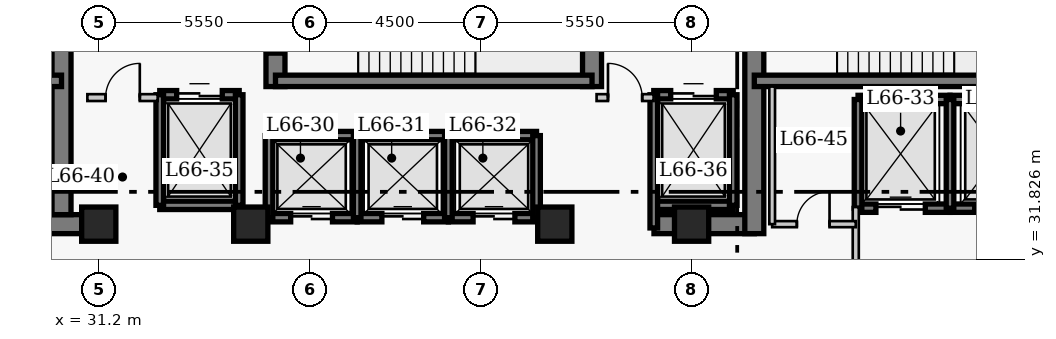
"""IFC4 building model, lengths in metres.
Left out: names, types, materials, properties, quantities, classifications, styles, units other than length and angle.
Written with IfcOpenShell. Run it as: python <this file> out.ifc"""

import sys

from ifc_helpers import new_model, si_unit, direction, frame, frame_2d, origin, origin_2d, place, context, subcontext, project, spatial, rectangle, extrude, element, fill, save


model = new_model("IFC4")
c1 = context("Model", 3, precision=1e-05, world=origin(), true_north=direction((0.0, 1.0)))
c2 = subcontext(c1, "Body", "Model", "MODEL_VIEW")
j1 = project(units=[si_unit("LENGTHUNIT", "METRE"), si_unit("PLANEANGLEUNIT", "RADIAN")], contexts=[c1])
p1 = place(None, origin())
s1 = spatial("IfcSite", under=j1, at=p1, CompositionType="ELEMENT")
p2 = place(p1, origin())
s2 = spatial("IfcBuilding", under=s1, at=p2, CompositionType="ELEMENT")
p3 = place(p2, frame((0.0, 0.0, 265.4)))
s3 = spatial("IfcBuildingStorey", under=s2, at=p3, CompositionType="ELEMENT", Elevation=265.4)
p4 = place(p3, frame((28.45, 32.75, 0.0), z_axis=(0.0, 0.0, 1.0), x_axis=(1.0, 0.0, 0.0)))
e1 = element("IfcWall", 1, at=p4, inside=s3, PredefinedType="SHEAR", context=c2, shape_type="SweptSolid", body=[
    extrude(rectangle(XDim=2.4, YDim=0.5, at=frame_2d((1.2, 0.0))), origin(), (0.0, 0.0, 1.0), 4.0),
])
p5 = place(p3, frame((45.81, 32.75, 0.0), z_axis=(0.0, 0.0, 1.0), x_axis=(1.0, 0.0, 0.0)))
e2 = element("IfcWall", 2, at=p5, inside=s3, PredefinedType="SHEAR", context=c2, shape_type="SweptSolid", body=[
    extrude(rectangle(XDim=2.64, YDim=0.5, at=frame_2d((1.32, 0.0))), origin(), (0.0, 0.0, 1.0), 4.0),
])
p6 = place(p3, frame((30.22, 33.0, 0.0), z_axis=(0.0, 0.0, 1.0), x_axis=(0.0, 1.0, 0.0)))
e3 = element("IfcWall", 3, at=p6, inside=s3, PredefinedType="SHEAR", context=c2, shape_type="SweptSolid", body=[
    extrude(rectangle(XDim=7.32, YDim=0.5, at=frame_2d((3.66, 0.0))), origin(), (0.0, 0.0, 1.0), 4.0),
])
p7 = place(p3, frame((35.85, 36.37, 0.0), z_axis=(0.0, 0.0, 1.0), x_axis=(0.0, 1.0, 0.0)))
e4 = element("IfcWall", 4, at=p7, inside=s3, PredefinedType="SHEAR", context=c2, shape_type="SweptSolid", body=[
    extrude(rectangle(XDim=3.95, YDim=0.5, at=frame_2d((1.975, 0.0))), origin(), (0.0, 0.0, 1.0), 4.0),
])
p8 = place(p7, frame((0.88, 0.0, 0.0)))
e5 = element("IfcOpeningElement", 5, at=p8, cuts=e4, PredefinedType="OPENING", context=c2, shape_type="SweptSolid", body=[
    extrude(rectangle(XDim=1.1, YDim=2.15, at=frame_2d((0.55, 1.075))), frame((0.0, 0.26, 0.0), z_axis=(0.0, -1.0, 0.0), x_axis=(1.0, 0.0, 0.0)), (0.0, 0.0, 1.0), 0.52),
])
p9 = place(p3, frame((44.18, 36.37, 0.0), z_axis=(0.0, 0.0, 1.0), x_axis=(0.0, 1.0, 0.0)))
e6 = element("IfcWall", 6, at=p9, inside=s3, PredefinedType="SHEAR", context=c2, shape_type="SweptSolid", body=[
    extrude(rectangle(XDim=3.95, YDim=0.5, at=frame_2d((1.975, 0.0))), origin(), (0.0, 0.0, 1.0), 4.0),
])
p10 = place(p3, frame((48.45, 32.5, 0.0), z_axis=(0.0, 0.0, 1.0), x_axis=(0.0, 1.0, 0.0)))
e7 = element("IfcWall", 7, at=p10, inside=s3, PredefinedType="SHEAR", context=c2, shape_type="SweptSolid", body=[
    extrude(rectangle(XDim=7.82, YDim=0.5, at=frame_2d((3.91, 0.0))), origin(), (0.0, 0.0, 1.0), 4.0),
])
p11 = place(p10, frame((5.7, 0.0, 0.0)))
e8 = element("IfcOpeningElement", 8, at=p11, cuts=e7, PredefinedType="OPENING", context=c2, shape_type="SweptSolid", body=[
    extrude(rectangle(XDim=1.1, YDim=2.15, at=frame_2d((0.55, 1.075))), frame((0.0, 0.26, 0.0), z_axis=(0.0, -1.0, 0.0), x_axis=(1.0, 0.0, 0.0)), (0.0, 0.0, 1.0), 0.52),
])
p12 = place(p3, frame((21.9, 36.52, 0.0), z_axis=(0.0, 0.0, 1.0), x_axis=(1.0, 0.0, 0.0)))
e9 = element("IfcWall", 9, at=p12, inside=s3, PredefinedType="SHEAR", context=c2, shape_type="SweptSolid", body=[
    extrude(rectangle(XDim=8.32, YDim=0.3, at=frame_2d((4.16, 0.0))), origin(), (0.0, 0.0, 1.0), 4.0),
])
p13 = place(p12, frame((0.9, 0.0, 0.0)))
e10 = element("IfcOpeningElement", 10, at=p13, cuts=e9, PredefinedType="OPENING", context=c2, shape_type="SweptSolid", body=[
    extrude(rectangle(XDim=1.1, YDim=2.15, at=frame_2d((0.55, 1.075))), frame((0.0, 0.16, 0.0), z_axis=(0.0, -1.0, 0.0), x_axis=(1.0, 0.0, 0.0)), (0.0, 0.0, 1.0), 0.32),
])
p14 = place(p3, frame((35.85, 36.52, 0.0), z_axis=(0.0, 0.0, 1.0), x_axis=(1.0, 0.0, 0.0)))
e11 = element("IfcWall", 11, at=p14, inside=s3, PredefinedType="SHEAR", context=c2, shape_type="SweptSolid", body=[
    extrude(rectangle(XDim=8.33, YDim=0.3, at=frame_2d((4.165, 0.0))), origin(), (0.0, 0.0, 1.0), 4.0),
])
p15 = place(p3, frame((48.45, 36.52, 0.0), z_axis=(0.0, 0.0, 1.0), x_axis=(1.0, 0.0, 0.0)))
e12 = element("IfcWall", 12, at=p15, inside=s3, PredefinedType="SHEAR", context=c2, shape_type="SweptSolid", body=[
    extrude(rectangle(XDim=8.32, YDim=0.3, at=frame_2d((4.16, 0.0))), origin(), (0.0, 0.0, 1.0), 4.0),
])
for number, where, z_axis, x_axis in (
    (13, (31.2, 32.75, 0.0), (0.0, 0.0, 1.0), (1.0, 0.0, 0.0)),
    (14, (35.2, 32.75, 0.0), (0.0, 0.0, 1.0), (1.0, 0.0, 0.0)),
    (15, (43.2, 32.75, 0.0), (0.0, 0.0, 1.0), (1.0, 0.0, 0.0)),
    (16, (46.8, 32.75, 0.0), (0.0, 0.0, 1.0), (1.0, 0.0, 0.0)),
):
    element("IfcColumn", number, at=place(p3, frame(where, z_axis=z_axis, x_axis=x_axis)), inside=s3, PredefinedType="COLUMN", context=c2, shape_type="SweptSolid", body=[
        extrude(rectangle(XDim=0.9, YDim=0.9, at=origin_2d()), origin(), (0.0, 0.0, 1.0), 4.0),
    ])
p16 = place(p3, frame((35.68, 35.08, 0.0), z_axis=(0.0, 0.0, 1.0), x_axis=(1.0, 0.0, 0.0)))
e17 = element("IfcWall", 17, at=p16, inside=s3, PredefinedType="SHEAR", context=c2, shape_type="SweptSolid", body=[
    extrude(rectangle(XDim=2.32, YDim=0.22, at=frame_2d((1.16, 0.0))), origin(), (0.0, 0.0, 1.0), 4.0),
])
p17 = place(p3, frame((35.68, 32.92, 0.0), z_axis=(0.0, 0.0, 1.0), x_axis=(1.0, 0.0, 0.0)))
e18 = element("IfcWall", 18, at=p17, inside=s3, PredefinedType="SHEAR", context=c2, shape_type="SweptSolid", body=[
    extrude(rectangle(XDim=2.32, YDim=0.22, at=frame_2d((1.16, 0.0))), origin(), (0.0, 0.0, 1.0), 4.0),
])
p18 = place(p17, frame((0.57, 0.0, 0.0)))
e19 = element("IfcOpeningElement", 19, at=p18, cuts=e18, PredefinedType="OPENING", context=c2, shape_type="SweptSolid", body=[
    extrude(rectangle(XDim=1.1, YDim=2.15, at=frame_2d((0.55, 1.075))), frame((0.0, 0.12, 0.0), z_axis=(0.0, -1.0, 0.0), x_axis=(1.0, 0.0, 0.0)), (0.0, 0.0, 1.0), 0.24),
])
p19 = place(p3, frame((35.68, 32.92, 0.0), z_axis=(0.0, 0.0, 1.0), x_axis=(0.0, 1.0, 0.0)))
e20 = element("IfcWall", 20, at=p19, inside=s3, PredefinedType="SHEAR", context=c2, shape_type="SweptSolid", body=[
    extrude(rectangle(XDim=2.16, YDim=0.2, at=frame_2d((1.08, 0.0))), origin(), (0.0, 0.0, 1.0), 4.0),
])
p20 = place(p3, frame((38.0, 35.08, 0.0), z_axis=(0.0, 0.0, 1.0), x_axis=(1.0, 0.0, 0.0)))
e21 = element("IfcWall", 21, at=p20, inside=s3, PredefinedType="SHEAR", context=c2, shape_type="SweptSolid", body=[
    extrude(rectangle(XDim=2.4, YDim=0.22, at=frame_2d((1.2, 0.0))), origin(), (0.0, 0.0, 1.0), 4.0),
])
p21 = place(p3, frame((38.0, 32.92, 0.0), z_axis=(0.0, 0.0, 1.0), x_axis=(1.0, 0.0, 0.0)))
e22 = element("IfcWall", 22, at=p21, inside=s3, PredefinedType="SHEAR", context=c2, shape_type="SweptSolid", body=[
    extrude(rectangle(XDim=2.4, YDim=0.22, at=frame_2d((1.2, 0.0))), origin(), (0.0, 0.0, 1.0), 4.0),
])
p22 = place(p21, frame((0.65, 0.0, 0.0)))
e23 = element("IfcOpeningElement", 23, at=p22, cuts=e22, PredefinedType="OPENING", context=c2, shape_type="SweptSolid", body=[
    extrude(rectangle(XDim=1.1, YDim=2.15, at=frame_2d((0.55, 1.075))), frame((0.0, 0.12, 0.0), z_axis=(0.0, -1.0, 0.0), x_axis=(1.0, 0.0, 0.0)), (0.0, 0.0, 1.0), 0.24),
])
p23 = place(p3, frame((38.0, 32.92, 0.0), z_axis=(0.0, 0.0, 1.0), x_axis=(0.0, 1.0, 0.0)))
e24 = element("IfcWall", 24, at=p23, inside=s3, PredefinedType="SHEAR", context=c2, shape_type="SweptSolid", body=[
    extrude(rectangle(XDim=2.16, YDim=0.2, at=frame_2d((1.08, 0.0))), origin(), (0.0, 0.0, 1.0), 4.0),
])
p24 = place(p3, frame((40.4, 35.08, 0.0), z_axis=(0.0, 0.0, 1.0), x_axis=(1.0, 0.0, 0.0)))
e25 = element("IfcWall", 25, at=p24, inside=s3, PredefinedType="SHEAR", context=c2, shape_type="SweptSolid", body=[
    extrude(rectangle(XDim=2.32, YDim=0.22, at=frame_2d((1.16, 0.0))), origin(), (0.0, 0.0, 1.0), 4.0),
])
p25 = place(p3, frame((40.4, 32.92, 0.0), z_axis=(0.0, 0.0, 1.0), x_axis=(1.0, 0.0, 0.0)))
e26 = element("IfcWall", 26, at=p25, inside=s3, PredefinedType="SHEAR", context=c2, shape_type="SweptSolid", body=[
    extrude(rectangle(XDim=2.32, YDim=0.22, at=frame_2d((1.16, 0.0))), origin(), (0.0, 0.0, 1.0), 4.0),
])
p26 = place(p25, frame((0.65, 0.0, 0.0)))
e27 = element("IfcOpeningElement", 27, at=p26, cuts=e26, PredefinedType="OPENING", context=c2, shape_type="SweptSolid", body=[
    extrude(rectangle(XDim=1.1, YDim=2.15, at=frame_2d((0.55, 1.075))), frame((0.0, 0.12, 0.0), z_axis=(0.0, -1.0, 0.0), x_axis=(1.0, 0.0, 0.0)), (0.0, 0.0, 1.0), 0.24),
])
for number, where, z_axis, x_axis in (
    (28, (40.4, 32.92, 0.0), (0.0, 0.0, 1.0), (0.0, 1.0, 0.0)),
    (29, (42.72, 32.92, 0.0), (0.0, 0.0, 1.0), (0.0, 1.0, 0.0)),
):
    element("IfcWall", number, at=place(p3, frame(where, z_axis=z_axis, x_axis=x_axis)), inside=s3, PredefinedType="SHEAR", context=c2, shape_type="SweptSolid", body=[
        extrude(rectangle(XDim=2.16, YDim=0.2, at=frame_2d((1.08, 0.0))), origin(), (0.0, 0.0, 1.0), 4.0),
    ])
p27 = place(p3, frame((51.18, 36.03, 0.0), z_axis=(0.0, 0.0, 1.0), x_axis=(1.0, 0.0, 0.0)))
e30 = element("IfcWall", 30, at=p27, inside=s3, PredefinedType="SHEAR", context=c2, shape_type="SweptSolid", body=[
    extrude(rectangle(XDim=2.42, YDim=0.22, at=frame_2d((1.21, 0.0))), origin(), (0.0, 0.0, 1.0), 4.0),
])
p28 = place(p3, frame((51.18, 33.17, 0.0), z_axis=(0.0, 0.0, 1.0), x_axis=(1.0, 0.0, 0.0)))
e31 = element("IfcWall", 31, at=p28, inside=s3, PredefinedType="SHEAR", context=c2, shape_type="SweptSolid", body=[
    extrude(rectangle(XDim=2.42, YDim=0.22, at=frame_2d((1.21, 0.0))), origin(), (0.0, 0.0, 1.0), 4.0),
])
p29 = place(p28, frame((0.47, 0.0, 0.0)))
e32 = element("IfcOpeningElement", 32, at=p29, cuts=e31, PredefinedType="OPENING", context=c2, shape_type="SweptSolid", body=[
    extrude(rectangle(XDim=1.3, YDim=2.15, at=frame_2d((0.65, 1.075))), frame((0.0, 0.12, 0.0), z_axis=(0.0, -1.0, 0.0), x_axis=(1.0, 0.0, 0.0)), (0.0, 0.0, 1.0), 0.24),
])
p30 = place(p3, frame((51.18, 33.17, 0.0), z_axis=(0.0, 0.0, 1.0), x_axis=(0.0, 1.0, 0.0)))
e33 = element("IfcWall", 33, at=p30, inside=s3, PredefinedType="SHEAR", context=c2, shape_type="SweptSolid", body=[
    extrude(rectangle(XDim=2.86, YDim=0.2, at=frame_2d((1.43, 0.0))), origin(), (0.0, 0.0, 1.0), 4.0),
])
p31 = place(p3, frame((53.6, 36.03, 0.0), z_axis=(0.0, 0.0, 1.0), x_axis=(1.0, 0.0, 0.0)))
e34 = element("IfcWall", 34, at=p31, inside=s3, PredefinedType="SHEAR", context=c2, shape_type="SweptSolid", body=[
    extrude(rectangle(XDim=2.42, YDim=0.22, at=frame_2d((1.21, 0.0))), origin(), (0.0, 0.0, 1.0), 4.0),
])
p32 = place(p3, frame((53.6, 33.17, 0.0), z_axis=(0.0, 0.0, 1.0), x_axis=(1.0, 0.0, 0.0)))
e35 = element("IfcWall", 35, at=p32, inside=s3, PredefinedType="SHEAR", context=c2, shape_type="SweptSolid", body=[
    extrude(rectangle(XDim=2.42, YDim=0.22, at=frame_2d((1.21, 0.0))), origin(), (0.0, 0.0, 1.0), 4.0),
])
p33 = place(p32, frame((0.65, 0.0, 0.0)))
e36 = element("IfcOpeningElement", 36, at=p33, cuts=e35, PredefinedType="OPENING", context=c2, shape_type="SweptSolid", body=[
    extrude(rectangle(XDim=1.3, YDim=2.15, at=frame_2d((0.65, 1.075))), frame((0.0, 0.12, 0.0), z_axis=(0.0, -1.0, 0.0), x_axis=(1.0, 0.0, 0.0)), (0.0, 0.0, 1.0), 0.24),
])
p34 = place(p3, frame((53.6, 33.17, 0.0), z_axis=(0.0, 0.0, 1.0), x_axis=(0.0, 1.0, 0.0)))
e37 = element("IfcWall", 37, at=p34, inside=s3, PredefinedType="SHEAR", context=c2, shape_type="SweptSolid", body=[
    extrude(rectangle(XDim=2.86, YDim=0.2, at=frame_2d((1.43, 0.0))), origin(), (0.0, 0.0, 1.0), 4.0),
])
p35 = place(p3, frame((32.805, 36.155, 0.0), z_axis=(0.0, 0.0, 1.0), x_axis=(1.0, 0.0, 0.0)))
e38 = element("IfcWall", 38, at=p35, inside=s3, PredefinedType="SHEAR", context=c2, shape_type="SweptSolid", body=[
    extrude(rectangle(XDim=2.09, YDim=0.22, at=frame_2d((1.045, 0.0))), origin(), (0.0, 0.0, 1.0), 4.0),
])
p36 = place(p35, frame((0.445, 0.0, 0.0)))
e39 = element("IfcOpeningElement", 39, at=p36, cuts=e38, PredefinedType="OPENING", context=c2, shape_type="SweptSolid", body=[
    extrude(rectangle(XDim=1.2, YDim=2.15, at=frame_2d((0.6, 1.075))), frame((0.0, 0.12, 0.0), z_axis=(0.0, -1.0, 0.0), x_axis=(1.0, 0.0, 0.0)), (0.0, 0.0, 1.0), 0.24),
])
p37 = place(p3, frame((32.805, 33.245, 0.0), z_axis=(0.0, 0.0, 1.0), x_axis=(1.0, 0.0, 0.0)))
e40 = element("IfcWall", 40, at=p37, inside=s3, PredefinedType="SHEAR", context=c2, shape_type="SweptSolid", body=[
    extrude(rectangle(XDim=2.09, YDim=0.22, at=frame_2d((1.045, 0.0))), origin(), (0.0, 0.0, 1.0), 4.0),
])
for number, where, z_axis, x_axis in (
    (41, (32.805, 33.245, 0.0), (0.0, 0.0, 1.0), (0.0, 1.0, 0.0)),
    (42, (34.895, 33.245, 0.0), (0.0, 0.0, 1.0), (0.0, 1.0, 0.0)),
):
    element("IfcWall", number, at=place(p3, frame(where, z_axis=z_axis, x_axis=x_axis)), inside=s3, PredefinedType="SHEAR", context=c2, shape_type="SweptSolid", body=[
        extrude(rectangle(XDim=2.91, YDim=0.2, at=frame_2d((1.455, 0.0))), origin(), (0.0, 0.0, 1.0), 4.0),
    ])
p38 = place(p3, frame((45.805, 36.155, 0.0), z_axis=(0.0, 0.0, 1.0), x_axis=(1.0, 0.0, 0.0)))
e43 = element("IfcWall", 43, at=p38, inside=s3, PredefinedType="SHEAR", context=c2, shape_type="SweptSolid", body=[
    extrude(rectangle(XDim=2.09, YDim=0.22, at=frame_2d((1.045, 0.0))), origin(), (0.0, 0.0, 1.0), 4.0),
])
p39 = place(p38, frame((0.445, 0.0, 0.0)))
e44 = element("IfcOpeningElement", 44, at=p39, cuts=e43, PredefinedType="OPENING", context=c2, shape_type="SweptSolid", body=[
    extrude(rectangle(XDim=1.2, YDim=2.15, at=frame_2d((0.6, 1.075))), frame((0.0, 0.12, 0.0), z_axis=(0.0, -1.0, 0.0), x_axis=(1.0, 0.0, 0.0)), (0.0, 0.0, 1.0), 0.24),
])
p40 = place(p3, frame((45.805, 33.245, 0.0), z_axis=(0.0, 0.0, 1.0), x_axis=(1.0, 0.0, 0.0)))
e45 = element("IfcWall", 45, at=p40, inside=s3, PredefinedType="SHEAR", context=c2, shape_type="SweptSolid", body=[
    extrude(rectangle(XDim=2.09, YDim=0.22, at=frame_2d((1.045, 0.0))), origin(), (0.0, 0.0, 1.0), 4.0),
])
p41 = place(p3, frame((45.805, 32.65, 0.0), z_axis=(0.0, 0.0, 1.0), x_axis=(0.0, 1.0, 0.0)))
e46 = element("IfcWall", 46, at=p41, inside=s3, PredefinedType="SHEAR", context=c2, shape_type="SweptSolid", body=[
    extrude(rectangle(XDim=3.505, YDim=0.2, at=frame_2d((1.752, 0.0))), origin(), (0.0, 0.0, 1.0), 4.0),
])
p42 = place(p3, frame((47.895, 33.245, 0.0), z_axis=(0.0, 0.0, 1.0), x_axis=(0.0, 1.0, 0.0)))
e47 = element("IfcWall", 47, at=p42, inside=s3, PredefinedType="SHEAR", context=c2, shape_type="SweptSolid", body=[
    extrude(rectangle(XDim=2.91, YDim=0.2, at=frame_2d((1.455, 0.0))), origin(), (0.0, 0.0, 1.0), 4.0),
])
p43 = place(p3, frame((30.9, 36.08, 0.0), z_axis=(0.0, 0.0, 1.0), x_axis=(1.0, 0.0, 0.0)))
e48 = element("IfcWall", 48, at=p43, inside=s3, PredefinedType="PARTITIONING", context=c2, shape_type="SweptSolid", body=[
    extrude(rectangle(XDim=1.85, YDim=0.18, at=frame_2d((0.925, 0.0))), origin(), (0.0, 0.0, 1.0), 3.76),
])
p44 = place(p43, frame((0.48, 0.0, 0.0)))
e49 = element("IfcOpeningElement", 49, at=p44, cuts=e48, PredefinedType="OPENING", context=c2, shape_type="SweptSolid", body=[
    extrude(rectangle(XDim=0.9, YDim=2.15, at=frame_2d((0.45, 1.075))), frame((0.0, 0.1, 0.0), z_axis=(0.0, -1.0, 0.0), x_axis=(1.0, 0.0, 0.0)), (0.0, 0.0, 1.0), 0.2),
])
p45 = place(p3, frame((44.3, 36.08, 0.0), z_axis=(0.0, 0.0, 1.0), x_axis=(1.0, 0.0, 0.0)))
e50 = element("IfcWall", 50, at=p45, inside=s3, PredefinedType="PARTITIONING", context=c2, shape_type="SweptSolid", body=[
    extrude(rectangle(XDim=1.5, YDim=0.18, at=frame_2d((0.75, 0.0))), origin(), (0.0, 0.0, 1.0), 3.76),
])
p46 = place(p45, frame((0.3, 0.0, 0.0)))
e51 = element("IfcOpeningElement", 51, at=p46, cuts=e50, PredefinedType="OPENING", context=c2, shape_type="SweptSolid", body=[
    extrude(rectangle(XDim=0.9, YDim=2.15, at=frame_2d((0.45, 1.075))), frame((0.0, 0.1, 0.0), z_axis=(0.0, -1.0, 0.0), x_axis=(1.0, 0.0, 0.0)), (0.0, 0.0, 1.0), 0.2),
])
p47 = place(p3, frame((51.12, 29.5, 0.0), z_axis=(0.0, 0.0, 1.0), x_axis=(0.0, 1.0, 0.0)))
e52 = element("IfcWall", 52, at=p47, inside=s3, PredefinedType="PARTITIONING", context=c2, shape_type="SweptSolid", body=[
    extrude(rectangle(XDim=3.7, YDim=0.16, at=frame_2d((1.85, 0.0))), origin(), (0.0, 0.0, 1.0), 3.76),
])
p48 = place(p47, frame((0.9, 0.0, 0.0)))
e53 = element("IfcOpeningElement", 53, at=p48, cuts=e52, PredefinedType="OPENING", context=c2, shape_type="SweptSolid", body=[
    extrude(rectangle(XDim=1.1, YDim=2.15, at=frame_2d((0.55, 1.075))), frame((0.0, 0.09, 0.0), z_axis=(0.0, -1.0, 0.0), x_axis=(1.0, 0.0, 0.0)), (0.0, 0.0, 1.0), 0.18),
])
p49 = place(p3, frame((48.92, 32.75, 0.0), z_axis=(0.0, 0.0, 1.0), x_axis=(1.0, 0.0, 0.0)))
e54 = element("IfcWall", 54, at=p49, inside=s3, PredefinedType="PARTITIONING", context=c2, shape_type="SweptSolid", body=[
    extrude(rectangle(XDim=2.2, YDim=0.16, at=frame_2d((1.1, 0.0))), origin(), (0.0, 0.0, 1.0), 3.76),
])
p50 = place(p49, frame((0.65, 0.0, 0.0)))
e55 = element("IfcOpeningElement", 55, at=p50, cuts=e54, PredefinedType="OPENING", context=c2, shape_type="SweptSolid", body=[
    extrude(rectangle(XDim=0.86, YDim=2.05, at=frame_2d((0.43, 1.025))), frame((0.0, 0.09, 0.0), z_axis=(0.0, -1.0, 0.0), x_axis=(1.0, 0.0, 0.0)), (0.0, 0.0, 1.0), 0.18),
])
p51 = place(p3, frame((48.92, 32.75, 0.0), z_axis=(0.0, 0.0, 1.0), x_axis=(0.0, 1.0, 0.0)))
e56 = element("IfcWall", 56, at=p51, inside=s3, PredefinedType="PARTITIONING", context=c2, shape_type="SweptSolid", body=[
    extrude(rectangle(XDim=3.62, YDim=0.15, at=frame_2d((1.81, 0.0))), origin(), (0.0, 0.0, 1.0), 3.76),
])
p52 = place(p18, origin())
e57 = element("IfcDoor", 57, at=p52, inside=s3, OperationType="DOUBLE_DOOR_SLIDING", PredefinedType="DOOR", context=c2, shape_type="SweptSolid", body=[
    extrude(rectangle(XDim=1.1, YDim=2.15, at=frame_2d((0.55, 1.075))), frame((0.0, 0.025, 0.0), z_axis=(0.0, -1.0, 0.0), x_axis=(1.0, 0.0, 0.0)), (0.0, 0.0, 1.0), 0.05),
])
fill(e19, e57)
p53 = place(p22, origin())
e58 = element("IfcDoor", 58, at=p53, inside=s3, OperationType="DOUBLE_DOOR_SLIDING", PredefinedType="DOOR", context=c2, shape_type="SweptSolid", body=[
    extrude(rectangle(XDim=1.1, YDim=2.15, at=frame_2d((0.55, 1.075))), frame((0.0, 0.025, 0.0), z_axis=(0.0, -1.0, 0.0), x_axis=(1.0, 0.0, 0.0)), (0.0, 0.0, 1.0), 0.05),
])
fill(e23, e58)
p54 = place(p26, origin())
e59 = element("IfcDoor", 59, at=p54, inside=s3, OperationType="DOUBLE_DOOR_SLIDING", PredefinedType="DOOR", context=c2, shape_type="SweptSolid", body=[
    extrude(rectangle(XDim=1.1, YDim=2.15, at=frame_2d((0.55, 1.075))), frame((0.0, 0.025, 0.0), z_axis=(0.0, -1.0, 0.0), x_axis=(1.0, 0.0, 0.0)), (0.0, 0.0, 1.0), 0.05),
])
fill(e27, e59)
p55 = place(p29, origin())
e60 = element("IfcDoor", 60, at=p55, inside=s3, OperationType="DOUBLE_DOOR_SLIDING", PredefinedType="DOOR", context=c2, shape_type="SweptSolid", body=[
    extrude(rectangle(XDim=1.3, YDim=2.15, at=frame_2d((0.65, 1.075))), frame((0.0, 0.025, 0.0), z_axis=(0.0, -1.0, 0.0), x_axis=(1.0, 0.0, 0.0)), (0.0, 0.0, 1.0), 0.05),
])
fill(e32, e60)
p56 = place(p33, origin())
e61 = element("IfcDoor", 61, at=p56, inside=s3, OperationType="DOUBLE_DOOR_SLIDING", PredefinedType="DOOR", context=c2, shape_type="SweptSolid", body=[
    extrude(rectangle(XDim=1.3, YDim=2.15, at=frame_2d((0.65, 1.075))), frame((0.0, 0.025, 0.0), z_axis=(0.0, -1.0, 0.0), x_axis=(1.0, 0.0, 0.0)), (0.0, 0.0, 1.0), 0.05),
])
fill(e36, e61)
p57 = place(p36, origin())
e62 = element("IfcDoor", 62, at=p57, inside=s3, OperationType="DOUBLE_DOOR_SLIDING", PredefinedType="DOOR", context=c2, shape_type="SweptSolid", body=[
    extrude(rectangle(XDim=1.2, YDim=2.15, at=frame_2d((0.6, 1.075))), frame((0.0, 0.025, 0.0), z_axis=(0.0, -1.0, 0.0), x_axis=(1.0, 0.0, 0.0)), (0.0, 0.0, 1.0), 0.05),
])
fill(e39, e62)
p58 = place(p39, origin())
e63 = element("IfcDoor", 63, at=p58, inside=s3, OperationType="DOUBLE_DOOR_SLIDING", PredefinedType="DOOR", context=c2, shape_type="SweptSolid", body=[
    extrude(rectangle(XDim=1.2, YDim=2.15, at=frame_2d((0.6, 1.075))), frame((0.0, 0.025, 0.0), z_axis=(0.0, -1.0, 0.0), x_axis=(1.0, 0.0, 0.0)), (0.0, 0.0, 1.0), 0.05),
])
fill(e44, e63)
p59 = place(p44, origin())
e64 = element("IfcDoor", 64, at=p59, inside=s3, OperationType="SINGLE_SWING_RIGHT", PredefinedType="DOOR", context=c2, shape_type="SweptSolid", body=[
    extrude(rectangle(XDim=0.9, YDim=2.15, at=frame_2d((0.45, 1.075))), frame((0.0, 0.025, 0.0), z_axis=(0.0, -1.0, 0.0), x_axis=(1.0, 0.0, 0.0)), (0.0, 0.0, 1.0), 0.05),
])
fill(e49, e64)
p60 = place(p46, origin())
e65 = element("IfcDoor", 65, at=p60, inside=s3, OperationType="SINGLE_SWING_LEFT", PredefinedType="DOOR", context=c2, shape_type="SweptSolid", body=[
    extrude(rectangle(XDim=0.9, YDim=2.15, at=frame_2d((0.45, 1.075))), frame((0.0, 0.025, 0.0), z_axis=(0.0, -1.0, 0.0), x_axis=(1.0, 0.0, 0.0)), (0.0, 0.0, 1.0), 0.05),
])
fill(e51, e65)
p61 = place(p50, origin())
e66 = element("IfcDoor", 66, at=p61, inside=s3, OperationType="SINGLE_SWING_RIGHT", PredefinedType="DOOR", context=c2, shape_type="SweptSolid", body=[
    extrude(rectangle(XDim=0.86, YDim=2.05, at=frame_2d((0.43, 1.025))), frame((0.0, 0.025, 0.0), z_axis=(0.0, -1.0, 0.0), x_axis=(1.0, 0.0, 0.0)), (0.0, 0.0, 1.0), 0.05),
])
fill(e55, e66)
p62 = place(p8, origin())
e67 = element("IfcDoor", 67, at=p62, inside=s3, OperationType="SINGLE_SWING_RIGHT", PredefinedType="DOOR", context=c2, shape_type="SweptSolid", body=[
    extrude(rectangle(XDim=1.1, YDim=2.15, at=frame_2d((0.55, 1.075))), frame((0.0, 0.025, 0.0), z_axis=(0.0, -1.0, 0.0), x_axis=(1.0, 0.0, 0.0)), (0.0, 0.0, 1.0), 0.05),
])
fill(e5, e67)
save(model, sys.argv[1])
